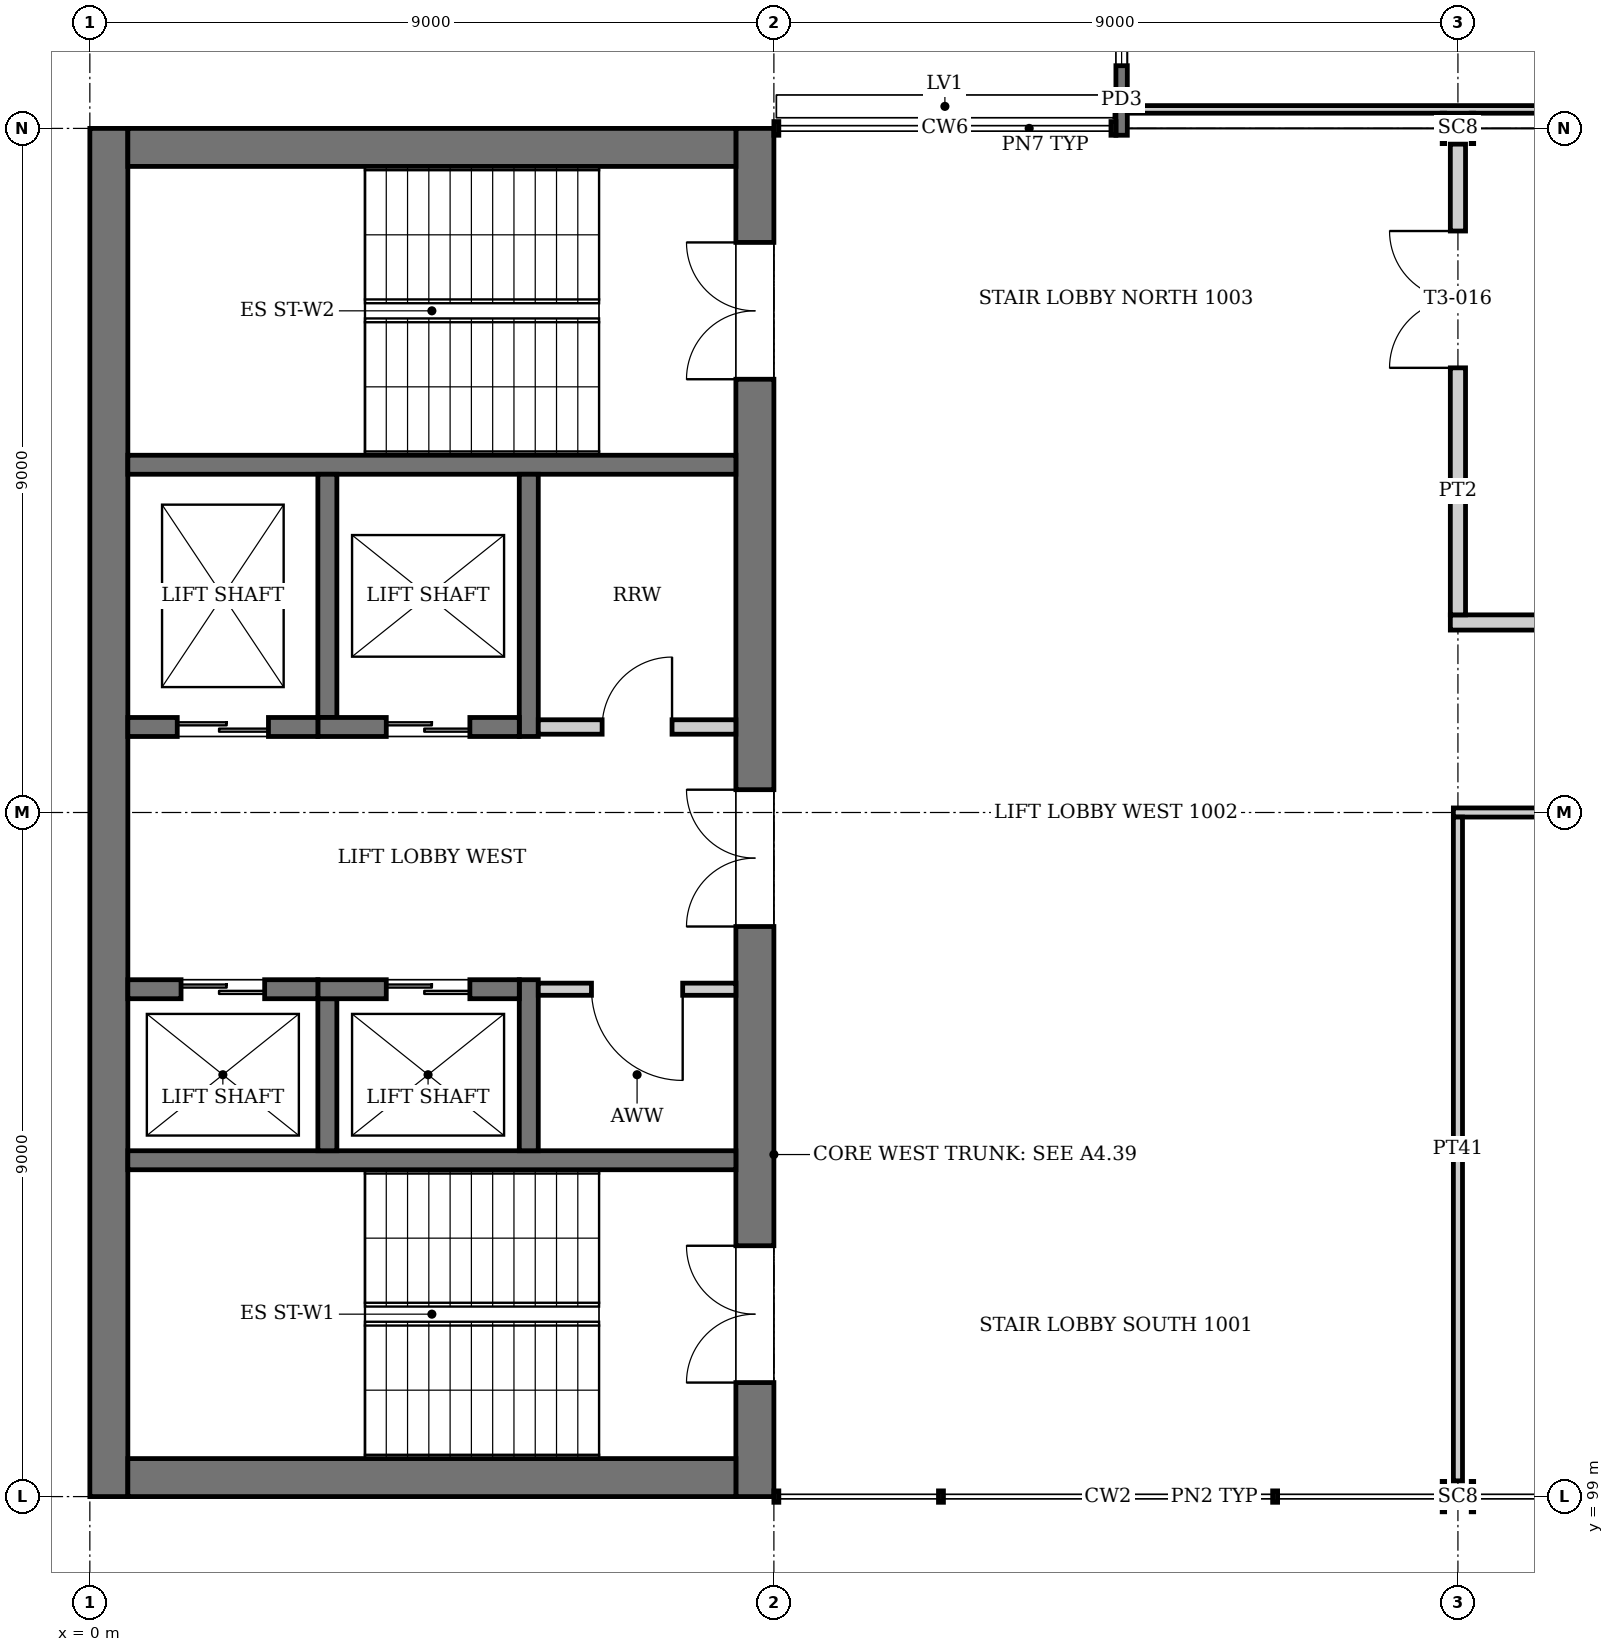
"""IFC4 building model, lengths in metres.
Left out: names, types, materials, properties, quantities, classifications, styles, units other than length and angle.
Written with IfcOpenShell. Run it as: python <this file> out.ifc"""

import sys

from ifc_helpers import new_model, si_unit, direction, frame, frame_2d, origin, origin_2d, place, context, subcontext, project, spatial, rectangle, i_section, extrude, element, fill, save


model = new_model("IFC4")
c1 = context("Model", 3, precision=1e-05, world=origin(), true_north=direction((0.0, 1.0)))
c2 = subcontext(c1, "Body", "Model", "MODEL_VIEW")
j1 = project(units=[si_unit("LENGTHUNIT", "METRE"), si_unit("PLANEANGLEUNIT", "RADIAN")], contexts=[c1])
p1 = place(None, origin())
s1 = spatial("IfcSite", under=j1, at=p1, CompositionType="ELEMENT")
p2 = place(p1, origin())
s2 = spatial("IfcBuilding", under=s1, at=p2, CompositionType="ELEMENT")
p3 = place(p2, frame((0.0, 0.0, 43.2)))
s3 = spatial("IfcBuildingStorey", under=s2, at=p3, CompositionType="ELEMENT", Elevation=43.2)
for number, where, z_axis, x_axis in (
    (1, (18.0, 99.0, 0.0), (0.0, 0.0, 1.0), (0.0, 1.0, 0.0)),
    (2, (18.0, 117.0, 0.0), (0.0, 0.0, 1.0), (0.0, 1.0, 0.0)),
):
    element("IfcColumn", number, at=place(p3, frame(where, z_axis=z_axis, x_axis=x_axis)), inside=s3, PredefinedType="COLUMN", context=c2, shape_type="SweptSolid", body=[
        extrude(i_section(OverallWidth=0.4, OverallDepth=0.414, WebThickness=0.025, FlangeThickness=0.032, at=origin_2d()), origin(), (0.0, 0.0, 1.0), 4.0),
    ])
p4 = place(p3, frame((0.25, 99.0, 0.0), z_axis=(0.0, 0.0, 1.0), x_axis=(0.0, 1.0, 0.0)))
e3 = element("IfcWall", 3, at=p4, inside=s3, PredefinedType="SHEAR", context=c2, shape_type="SweptSolid", body=[
    extrude(rectangle(XDim=18.0, YDim=0.5, at=frame_2d((9.0, 0.0))), origin(), (0.0, 0.0, 1.0), 4.0),
])
p5 = place(p3, frame((8.75, 99.0, 0.0), z_axis=(0.0, 0.0, 1.0), x_axis=(0.0, 1.0, 0.0)))
e4 = element("IfcWall", 4, at=p5, inside=s3, PredefinedType="SHEAR", context=c2, shape_type="SweptSolid", body=[
    extrude(rectangle(XDim=18.0, YDim=0.5, at=frame_2d((9.0, 0.0))), origin(), (0.0, 0.0, 1.0), 4.0),
])
p6 = place(p5, frame((1.5, 0.0, 0.0)))
e5 = element("IfcOpeningElement", 5, at=p6, cuts=e4, PredefinedType="OPENING", context=c2, shape_type="SweptSolid", body=[
    extrude(rectangle(XDim=1.8, YDim=2.1, at=frame_2d((0.9, 1.05))), frame((0.0, 0.26, 0.0), z_axis=(0.0, -1.0, 0.0), x_axis=(1.0, 0.0, 0.0)), (0.0, 0.0, 1.0), 0.52),
])
p7 = place(p5, frame((14.7, 0.0, 0.0)))
e6 = element("IfcOpeningElement", 6, at=p7, cuts=e4, PredefinedType="OPENING", context=c2, shape_type="SweptSolid", body=[
    extrude(rectangle(XDim=1.8, YDim=2.1, at=frame_2d((0.9, 1.05))), frame((0.0, 0.26, 0.0), z_axis=(0.0, -1.0, 0.0), x_axis=(1.0, 0.0, 0.0)), (0.0, 0.0, 1.0), 0.52),
])
p8 = place(p5, frame((7.5, 0.0, 0.0)))
e7 = element("IfcOpeningElement", 7, at=p8, cuts=e4, PredefinedType="OPENING", context=c2, shape_type="SweptSolid", body=[
    extrude(rectangle(XDim=1.8, YDim=2.1, at=frame_2d((0.9, 1.05))), frame((0.0, 0.26, 0.0), z_axis=(0.0, -1.0, 0.0), x_axis=(1.0, 0.0, 0.0)), (0.0, 0.0, 1.0), 0.52),
])
for number, where, z_axis, x_axis in (
    (8, (0.5, 99.25, 0.0), (0.0, 0.0, 1.0), (1.0, 0.0, 0.0)),
    (9, (0.5, 116.75, 0.0), (0.0, 0.0, 1.0), (1.0, 0.0, 0.0)),
):
    element("IfcWall", number, at=place(p3, frame(where, z_axis=z_axis, x_axis=x_axis)), inside=s3, PredefinedType="SHEAR", context=c2, shape_type="SweptSolid", body=[
        extrude(rectangle(XDim=8.0, YDim=0.5, at=frame_2d((4.0, 0.0))), origin(), (0.0, 0.0, 1.0), 4.0),
    ])
p9 = place(p3, frame((13.575, 120.45, -0.15), z_axis=(0.0, 0.0, 1.0), x_axis=(0.0, -1.0, 0.0)))
e10 = element("IfcWall", 10, at=p9, inside=s3, PredefinedType="SOLIDWALL", context=c2, shape_type="SweptSolid", body=[
    extrude(rectangle(XDim=3.54, YDim=0.15, at=frame_2d((1.77, 0.0))), origin(), (0.0, 0.0, 1.0), 2.75),
])
p10 = place(p9, frame((0.625, 0.0, 1.05)))
e11 = element("IfcOpeningElement", 11, at=p10, cuts=e10, PredefinedType="OPENING", context=c2, shape_type="SweptSolid", body=[
    extrude(rectangle(XDim=2.0, YDim=1.4, at=frame_2d((1.0, 0.7))), frame((0.0, 0.085, 0.0), z_axis=(0.0, -1.0, 0.0), x_axis=(1.0, 0.0, 0.0)), (0.0, 0.0, 1.0), 0.17),
])
p11 = place(p3, frame((13.65, 117.25, 0.0), z_axis=(0.0, 0.0, 1.0), x_axis=(1.0, 0.0, 0.0)))
e12 = element("IfcWall", 12, at=p11, inside=s3, PredefinedType="PARTITIONING", context=c2, shape_type="SweptSolid", body=[
    extrude(rectangle(XDim=13.2, YDim=0.1, at=frame_2d((6.6, 0.0))), origin(), (0.0, 0.0, 1.0), 2.6),
])
p12 = place(p11, frame((6.1, 0.0, 0.0)))
e13 = element("IfcOpeningElement", 13, at=p12, cuts=e12, PredefinedType="OPENING", context=c2, shape_type="SweptSolid", body=[
    extrude(rectangle(XDim=0.9, YDim=2.1, at=frame_2d((0.45, 1.05))), frame((0.0, 0.06, 0.0), z_axis=(0.0, -1.0, 0.0), x_axis=(1.0, 0.0, 0.0)), (0.0, 0.0, 1.0), 0.12),
])
for number, where, z_axis, x_axis in (
    (14, (8.5, 103.425, 0.0), (0.0, 0.0, 1.0), (-1.0, 0.0, 0.0)),
    (15, (8.5, 112.575, 0.0), (0.0, 0.0, 1.0), (-1.0, 0.0, 0.0)),
):
    element("IfcWall", number, at=place(p3, frame(where, z_axis=z_axis, x_axis=x_axis)), inside=s3, PredefinedType="SOLIDWALL", context=c2, shape_type="SweptSolid", body=[
        extrude(rectangle(XDim=8.0, YDim=0.25, at=frame_2d((4.0, 0.0))), origin(), (0.0, 0.0, 1.0), 3.75),
    ])
p13 = place(p3, frame((5.775, 103.55, 0.0), z_axis=(0.0, 0.0, 1.0), x_axis=(0.0, 1.0, 0.0)))
e16 = element("IfcWall", 16, at=p13, inside=s3, PredefinedType="SOLIDWALL", context=c2, shape_type="SweptSolid", body=[
    extrude(rectangle(XDim=2.25, YDim=0.25, at=frame_2d((1.125, 0.0))), origin(), (0.0, 0.0, 1.0), 4.0),
])
p14 = place(p3, frame((3.125, 103.55, 0.0), z_axis=(0.0, 0.0, 1.0), x_axis=(0.0, 1.0, 0.0)))
e17 = element("IfcWall", 17, at=p14, inside=s3, PredefinedType="SOLIDWALL", context=c2, shape_type="SweptSolid", body=[
    extrude(rectangle(XDim=2.0, YDim=0.25, at=frame_2d((1.0, 0.0))), origin(), (0.0, 0.0, 1.0), 4.0),
])
p15 = place(p3, frame((5.65, 105.675, 0.0), z_axis=(0.0, 0.0, 1.0), x_axis=(-1.0, 0.0, 0.0)))
e18 = element("IfcWall", 18, at=p15, inside=s3, PredefinedType="SOLIDWALL", context=c2, shape_type="SweptSolid", body=[
    extrude(rectangle(XDim=2.65, YDim=0.25, at=frame_2d((1.325, 0.0))), origin(), (0.0, 0.0, 1.0), 4.0),
])
p16 = place(p15, frame((0.65, 0.0, 0.0)))
e19 = element("IfcOpeningElement", 19, at=p16, cuts=e18, PredefinedType="OPENING", context=c2, shape_type="SweptSolid", body=[
    extrude(rectangle(XDim=1.1, YDim=2.1, at=frame_2d((0.55, 1.05))), frame((0.0, 0.135, 0.0), z_axis=(0.0, -1.0, 0.0), x_axis=(1.0, 0.0, 0.0)), (0.0, 0.0, 1.0), 0.27),
])
p17 = place(p3, frame((3.0, 105.675, 0.0), z_axis=(0.0, 0.0, 1.0), x_axis=(-1.0, 0.0, 0.0)))
e20 = element("IfcWall", 20, at=p17, inside=s3, PredefinedType="SOLIDWALL", context=c2, shape_type="SweptSolid", body=[
    extrude(rectangle(XDim=2.5, YDim=0.25, at=frame_2d((1.25, 0.0))), origin(), (0.0, 0.0, 1.0), 4.0),
])
p18 = place(p17, frame((0.7, 0.0, 0.0)))
e21 = element("IfcOpeningElement", 21, at=p18, cuts=e20, PredefinedType="OPENING", context=c2, shape_type="SweptSolid", body=[
    extrude(rectangle(XDim=1.1, YDim=2.1, at=frame_2d((0.55, 1.05))), frame((0.0, 0.135, 0.0), z_axis=(0.0, -1.0, 0.0), x_axis=(1.0, 0.0, 0.0)), (0.0, 0.0, 1.0), 0.27),
])
p19 = place(p3, frame((5.775, 109.0, 0.0), z_axis=(0.0, 0.0, 1.0), x_axis=(0.0, 1.0, 0.0)))
e22 = element("IfcWall", 22, at=p19, inside=s3, PredefinedType="SOLIDWALL", context=c2, shape_type="SweptSolid", body=[
    extrude(rectangle(XDim=3.45, YDim=0.25, at=frame_2d((1.725, 0.0))), origin(), (0.0, 0.0, 1.0), 4.0),
])
p20 = place(p3, frame((3.125, 109.25, 0.0), z_axis=(0.0, 0.0, 1.0), x_axis=(0.0, 1.0, 0.0)))
e23 = element("IfcWall", 23, at=p20, inside=s3, PredefinedType="SOLIDWALL", context=c2, shape_type="SweptSolid", body=[
    extrude(rectangle(XDim=3.2, YDim=0.25, at=frame_2d((1.6, 0.0))), origin(), (0.0, 0.0, 1.0), 4.0),
])
p21 = place(p3, frame((5.65, 109.125, 0.0), z_axis=(0.0, 0.0, 1.0), x_axis=(-1.0, 0.0, 0.0)))
e24 = element("IfcWall", 24, at=p21, inside=s3, PredefinedType="SOLIDWALL", context=c2, shape_type="SweptSolid", body=[
    extrude(rectangle(XDim=2.65, YDim=0.25, at=frame_2d((1.325, 0.0))), origin(), (0.0, 0.0, 1.0), 4.0),
])
p22 = place(p21, frame((0.65, 0.0, 0.0)))
e25 = element("IfcOpeningElement", 25, at=p22, cuts=e24, PredefinedType="OPENING", context=c2, shape_type="SweptSolid", body=[
    extrude(rectangle(XDim=1.1, YDim=2.1, at=frame_2d((0.55, 1.05))), frame((0.0, 0.135, 0.0), z_axis=(0.0, -1.0, 0.0), x_axis=(1.0, 0.0, 0.0)), (0.0, 0.0, 1.0), 0.27),
])
p23 = place(p3, frame((3.0, 109.125, 0.0), z_axis=(0.0, 0.0, 1.0), x_axis=(-1.0, 0.0, 0.0)))
e26 = element("IfcWall", 26, at=p23, inside=s3, PredefinedType="SOLIDWALL", context=c2, shape_type="SweptSolid", body=[
    extrude(rectangle(XDim=2.5, YDim=0.25, at=frame_2d((1.25, 0.0))), origin(), (0.0, 0.0, 1.0), 4.0),
])
p24 = place(p23, frame((0.65, 0.0, 0.0)))
e27 = element("IfcOpeningElement", 27, at=p24, cuts=e26, PredefinedType="OPENING", context=c2, shape_type="SweptSolid", body=[
    extrude(rectangle(XDim=1.2, YDim=2.1, at=frame_2d((0.6, 1.05))), frame((0.0, 0.135, 0.0), z_axis=(0.0, -1.0, 0.0), x_axis=(1.0, 0.0, 0.0)), (0.0, 0.0, 1.0), 0.27),
])
p25 = place(p3, frame((8.5, 105.675, 0.0), z_axis=(0.0, 0.0, 1.0), x_axis=(-1.0, 0.0, 0.0)))
e28 = element("IfcWall", 28, at=p25, inside=s3, PredefinedType="PARTITIONING", context=c2, shape_type="SweptSolid", body=[
    extrude(rectangle(XDim=2.6, YDim=0.16, at=frame_2d((1.3, 0.0))), origin(), (0.0, 0.0, 1.0), 3.75),
])
p26 = place(p25, frame((0.7, 0.0, 0.0)))
e29 = element("IfcOpeningElement", 29, at=p26, cuts=e28, PredefinedType="OPENING", context=c2, shape_type="SweptSolid", body=[
    extrude(rectangle(XDim=1.2, YDim=2.1, at=frame_2d((0.6, 1.05))), frame((0.0, 0.09, 0.0), z_axis=(0.0, -1.0, 0.0), x_axis=(1.0, 0.0, 0.0)), (0.0, 0.0, 1.0), 0.18),
])
p27 = place(p3, frame((8.5, 109.125, 0.0), z_axis=(0.0, 0.0, 1.0), x_axis=(-1.0, 0.0, 0.0)))
e30 = element("IfcWall", 30, at=p27, inside=s3, PredefinedType="PARTITIONING", context=c2, shape_type="SweptSolid", body=[
    extrude(rectangle(XDim=2.6, YDim=0.19, at=frame_2d((1.3, 0.0))), origin(), (0.0, 0.0, 1.0), 3.75),
])
p28 = place(p27, frame((0.84, 0.0, 0.0)))
e31 = element("IfcOpeningElement", 31, at=p28, cuts=e30, PredefinedType="OPENING", context=c2, shape_type="SweptSolid", body=[
    extrude(rectangle(XDim=0.92, YDim=2.1, at=frame_2d((0.46, 1.05))), frame((0.0, 0.105, 0.0), z_axis=(0.0, -1.0, 0.0), x_axis=(1.0, 0.0, 0.0)), (0.0, 0.0, 1.0), 0.21),
])
p29 = place(p3, frame((17.94, 108.0, 0.0), z_axis=(0.0, 0.0, 1.0), x_axis=(1.0, 0.0, 0.0)))
e32 = element("IfcWall", 32, at=p29, inside=s3, PredefinedType="PARTITIONING", context=c2, shape_type="SweptSolid", body=[
    extrude(rectangle(XDim=17.985, YDim=0.12, at=frame_2d((8.993, 0.0))), origin(), (0.0, 0.0, 1.0), 3.05),
])
p30 = place(p29, frame((3.66, 0.0, 0.0)))
e33 = element("IfcOpeningElement", 33, at=p30, cuts=e32, PredefinedType="OPENING", context=c2, shape_type="SweptSolid", body=[
    extrude(rectangle(XDim=1.8, YDim=2.1, at=frame_2d((0.9, 1.05))), frame((0.0, 0.07, 0.0), z_axis=(0.0, -1.0, 0.0), x_axis=(1.0, 0.0, 0.0)), (0.0, 0.0, 1.0), 0.14),
])
p31 = place(p29, frame((12.66, 0.0, 0.0)))
e34 = element("IfcOpeningElement", 34, at=p31, cuts=e32, PredefinedType="OPENING", context=c2, shape_type="SweptSolid", body=[
    extrude(rectangle(XDim=1.8, YDim=2.1, at=frame_2d((0.9, 1.05))), frame((0.0, 0.07, 0.0), z_axis=(0.0, -1.0, 0.0), x_axis=(1.0, 0.0, 0.0)), (0.0, 0.0, 1.0), 0.14),
])
p32 = place(p3, frame((17.9, 110.5, 0.0), z_axis=(0.0, 0.0, 1.0), x_axis=(1.0, 0.0, 0.0)))
e35 = element("IfcWall", 35, at=p32, inside=s3, PredefinedType="PARTITIONING", context=c2, shape_type="SweptSolid", body=[
    extrude(rectangle(XDim=22.7, YDim=0.2, at=frame_2d((11.35, 0.0))), origin(), (0.0, 0.0, 1.0), 3.05),
])
p33 = place(p32, frame((10.45, 0.0, 0.0)))
e36 = element("IfcOpeningElement", 36, at=p33, cuts=e35, PredefinedType="OPENING", context=c2, shape_type="SweptSolid", body=[
    extrude(rectangle(XDim=1.8, YDim=2.1, at=frame_2d((0.9, 1.05))), frame((0.0, 0.11, 0.0), z_axis=(0.0, -1.0, 0.0), x_axis=(1.0, 0.0, 0.0)), (0.0, 0.0, 1.0), 0.22),
])
p34 = place(p3, frame((18.0, 99.207, 0.0), z_axis=(0.0, 0.0, 1.0), x_axis=(0.0, 1.0, 0.0)))
e37 = element("IfcWall", 37, at=p34, inside=s3, PredefinedType="PARTITIONING", context=c2, shape_type="SweptSolid", body=[
    extrude(rectangle(XDim=8.733, YDim=0.12, at=frame_2d((4.366, 0.0))), origin(), (0.0, 0.0, 1.0), 3.05),
])
p35 = place(p3, frame((18.0, 110.6, 0.0), z_axis=(0.0, 0.0, 1.0), x_axis=(0.0, 1.0, 0.0)))
e38 = element("IfcWall", 38, at=p35, inside=s3, PredefinedType="PARTITIONING", context=c2, shape_type="SweptSolid", body=[
    extrude(rectangle(XDim=6.193, YDim=0.2, at=frame_2d((3.096, 0.0))), origin(), (0.0, 0.0, 1.0), 3.05),
])
p36 = place(p35, frame((3.25, 0.0, 0.0)))
e39 = element("IfcOpeningElement", 39, at=p36, cuts=e38, PredefinedType="OPENING", context=c2, shape_type="SweptSolid", body=[
    extrude(rectangle(XDim=1.8, YDim=2.1, at=frame_2d((0.9, 1.05))), frame((0.0, 0.11, 0.0), z_axis=(0.0, -1.0, 0.0), x_axis=(1.0, 0.0, 0.0)), (0.0, 0.0, 1.0), 0.22),
])
p37 = place(p10, origin())
e40 = element("IfcWindow", 40, at=p37, inside=s3, PartitioningType="SINGLE_PANEL", PredefinedType="WINDOW", context=c2, shape_type="SweptSolid", body=[
    extrude(rectangle(XDim=2.0, YDim=1.4, at=frame_2d((1.0, 0.7))), frame((0.0, 0.03, 0.0), z_axis=(0.0, -1.0, 0.0), x_axis=(1.0, 0.0, 0.0)), (0.0, 0.0, 1.0), 0.06),
])
fill(e11, e40)
p38 = place(p16, origin())
e41 = element("IfcDoor", 41, at=p38, inside=s3, OperationType="DOUBLE_DOOR_SLIDING", PredefinedType="DOOR", context=c2, shape_type="SweptSolid", body=[
    extrude(rectangle(XDim=1.1, YDim=2.1, at=frame_2d((0.55, 1.05))), frame((0.0, 0.025, 0.0), z_axis=(0.0, -1.0, 0.0), x_axis=(1.0, 0.0, 0.0)), (0.0, 0.0, 1.0), 0.05),
])
fill(e19, e41)
p39 = place(p18, origin())
e42 = element("IfcDoor", 42, at=p39, inside=s3, OperationType="DOUBLE_DOOR_SLIDING", PredefinedType="DOOR", context=c2, shape_type="SweptSolid", body=[
    extrude(rectangle(XDim=1.1, YDim=2.1, at=frame_2d((0.55, 1.05))), frame((0.0, 0.025, 0.0), z_axis=(0.0, -1.0, 0.0), x_axis=(1.0, 0.0, 0.0)), (0.0, 0.0, 1.0), 0.05),
])
fill(e21, e42)
p40 = place(p22, origin())
e43 = element("IfcDoor", 43, at=p40, inside=s3, OperationType="DOUBLE_DOOR_SLIDING", PredefinedType="DOOR", context=c2, shape_type="SweptSolid", body=[
    extrude(rectangle(XDim=1.1, YDim=2.1, at=frame_2d((0.55, 1.05))), frame((0.0, 0.025, 0.0), z_axis=(0.0, -1.0, 0.0), x_axis=(1.0, 0.0, 0.0)), (0.0, 0.0, 1.0), 0.05),
])
fill(e25, e43)
p41 = place(p24, origin())
e44 = element("IfcDoor", 44, at=p41, inside=s3, OperationType="DOUBLE_DOOR_SLIDING", PredefinedType="DOOR", context=c2, shape_type="SweptSolid", body=[
    extrude(rectangle(XDim=1.2, YDim=2.1, at=frame_2d((0.6, 1.05))), frame((0.0, 0.025, 0.0), z_axis=(0.0, -1.0, 0.0), x_axis=(1.0, 0.0, 0.0)), (0.0, 0.0, 1.0), 0.05),
])
fill(e27, e44)
p42 = place(p36, origin())
e45 = element("IfcDoor", 45, at=p42, inside=s3, OperationType="DOUBLE_DOOR_SINGLE_SWING", PredefinedType="DOOR", context=c2, shape_type="SweptSolid", body=[
    extrude(rectangle(XDim=1.8, YDim=2.1, at=frame_2d((0.9, 1.05))), frame((0.0, 0.025, 0.0), z_axis=(0.0, -1.0, 0.0), x_axis=(1.0, 0.0, 0.0)), (0.0, 0.0, 1.0), 0.05),
])
fill(e39, e45)
p43 = place(p6, origin())
e46 = element("IfcDoor", 46, at=p43, inside=s3, OperationType="DOUBLE_DOOR_SINGLE_SWING", PredefinedType="DOOR", context=c2, shape_type="SweptSolid", body=[
    extrude(rectangle(XDim=1.8, YDim=2.1, at=frame_2d((0.9, 1.05))), frame((0.0, 0.025, 0.0), z_axis=(0.0, -1.0, 0.0), x_axis=(1.0, 0.0, 0.0)), (0.0, 0.0, 1.0), 0.05),
])
fill(e5, e46)
p44 = place(p7, origin())
e47 = element("IfcDoor", 47, at=p44, inside=s3, OperationType="DOUBLE_DOOR_SINGLE_SWING", PredefinedType="DOOR", context=c2, shape_type="SweptSolid", body=[
    extrude(rectangle(XDim=1.8, YDim=2.1, at=frame_2d((0.9, 1.05))), frame((0.0, 0.025, 0.0), z_axis=(0.0, -1.0, 0.0), x_axis=(1.0, 0.0, 0.0)), (0.0, 0.0, 1.0), 0.05),
])
fill(e6, e47)
p45 = place(p8, origin())
e48 = element("IfcDoor", 48, at=p45, inside=s3, OperationType="DOUBLE_DOOR_SINGLE_SWING", PredefinedType="DOOR", context=c2, shape_type="SweptSolid", body=[
    extrude(rectangle(XDim=1.8, YDim=2.1, at=frame_2d((0.9, 1.05))), frame((0.0, 0.025, 0.0), z_axis=(0.0, -1.0, 0.0), x_axis=(1.0, 0.0, 0.0)), (0.0, 0.0, 1.0), 0.05),
])
fill(e7, e48)
p46 = place(p26, origin())
e49 = element("IfcDoor", 49, at=p46, inside=s3, OperationType="SINGLE_SWING_LEFT", PredefinedType="DOOR", context=c2, shape_type="SweptSolid", body=[
    extrude(rectangle(XDim=1.2, YDim=2.1, at=frame_2d((0.6, 1.05))), frame((0.0, 0.025, 0.0), z_axis=(0.0, -1.0, 0.0), x_axis=(1.0, 0.0, 0.0)), (0.0, 0.0, 1.0), 0.05),
])
fill(e29, e49)
p47 = place(p28, frame((0.92, 0.0, 0.0), z_axis=(0.0, 0.0, 1.0), x_axis=(-1.0, 0.0, 0.0)))
e50 = element("IfcDoor", 50, at=p47, inside=s3, OperationType="SINGLE_SWING_RIGHT", PredefinedType="DOOR", context=c2, shape_type="SweptSolid", body=[
    extrude(rectangle(XDim=0.92, YDim=2.1, at=frame_2d((0.46, 1.05))), frame((0.0, 0.025, 0.0), z_axis=(0.0, -1.0, 0.0), x_axis=(1.0, 0.0, 0.0)), (0.0, 0.0, 1.0), 0.05),
])
fill(e31, e50)
save(model, sys.argv[1])
